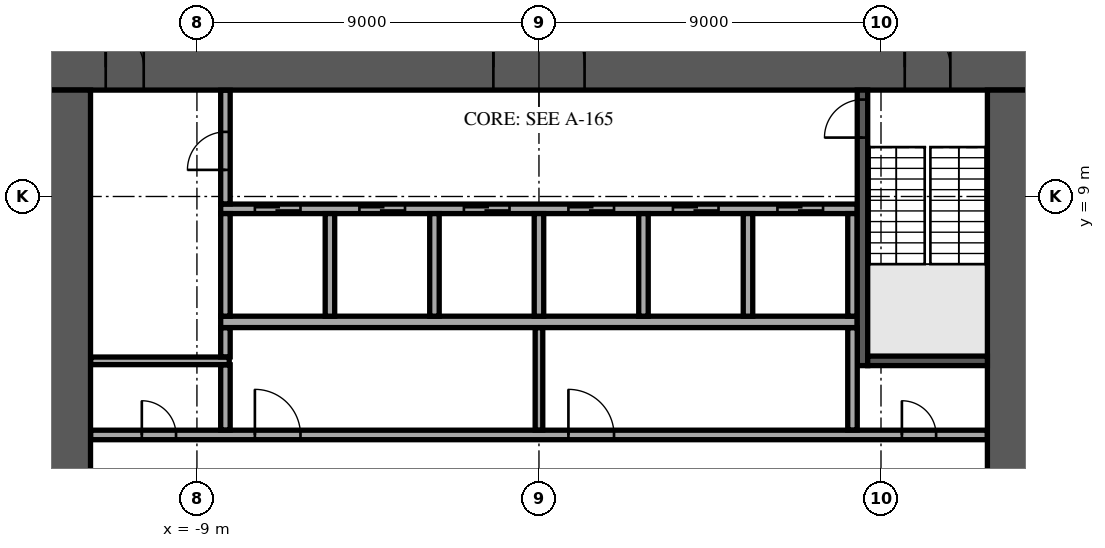
"""IFC4 building model, lengths in metres.
Left out: names, types, materials, properties, quantities, classifications, styles, units other than length and angle.
Written with IfcOpenShell. Run it as: python <this file> out.ifc"""

import sys

from ifc_helpers import new_model, si_unit, direction, frame, frame_2d, origin, place, context, subcontext, project, spatial, rectangle, extrude, element, fill, save


model = new_model("IFC4")
c1 = context("Model", 3, precision=1e-05, world=origin(), true_north=direction((0.0, 1.0)))
c2 = subcontext(c1, "Body", "Model", "MODEL_VIEW")
j1 = project(units=[si_unit("LENGTHUNIT", "METRE"), si_unit("PLANEANGLEUNIT", "RADIAN")], contexts=[c1])
p1 = place(None, origin())
s1 = spatial("IfcSite", under=j1, at=p1, CompositionType="ELEMENT")
p2 = place(p1, origin())
s2 = spatial("IfcBuilding", under=s1, at=p2, CompositionType="ELEMENT")
p3 = place(p2, frame((0.0, 0.0, 9.0)))
s3 = spatial("IfcBuildingStorey", under=s2, at=p3, CompositionType="ELEMENT", Elevation=9.0)
p4 = place(p3, frame((-13.0, 12.4, 0.0), z_axis=(0.0, 0.0, 1.0), x_axis=(1.0, 0.0, 0.0)))
e1 = element("IfcWall", 1, at=p4, inside=s3, PredefinedType="SHEAR", context=c2, shape_type="SweptSolid", body=[
    extrude(rectangle(XDim=26.0, YDim=1.2, at=frame_2d((13.0, 0.0))), origin(), (0.0, 0.0, 1.0), 4.1),
])
p5 = place(p4, frame((11.8, 0.0, 0.0)))
e2 = element("IfcOpeningElement", 2, at=p5, cuts=e1, PredefinedType="OPENING", context=c2, shape_type="SweptSolid", body=[
    extrude(rectangle(XDim=2.4, YDim=2.4, at=frame_2d((1.2, 1.2))), frame((0.0, 0.61, 0.0), z_axis=(0.0, -1.0, 0.0), x_axis=(1.0, 0.0, 0.0)), (0.0, 0.0, 1.0), 1.22),
])
p6 = place(p4, frame((22.625, 0.0, 0.0)))
e3 = element("IfcOpeningElement", 3, at=p6, cuts=e1, PredefinedType="OPENING", context=c2, shape_type="SweptSolid", body=[
    extrude(rectangle(XDim=1.2, YDim=2.1, at=frame_2d((0.6, 1.05))), frame((0.0, 0.61, 0.0), z_axis=(0.0, -1.0, 0.0), x_axis=(1.0, 0.0, 0.0)), (0.0, 0.0, 1.0), 1.22),
])
p7 = place(p4, frame((1.6, 0.0, 0.0)))
e4 = element("IfcOpeningElement", 4, at=p7, cuts=e1, PredefinedType="OPENING", context=c2, shape_type="SweptSolid", body=[
    extrude(rectangle(XDim=1.0, YDim=2.1, at=frame_2d((0.5, 1.05))), frame((0.0, 0.61, 0.0), z_axis=(0.0, -1.0, 0.0), x_axis=(1.0, 0.0, 0.0)), (0.0, 0.0, 1.0), 1.22),
])
p8 = place(p3, frame((12.4, -11.8, 0.0), z_axis=(0.0, 0.0, 1.0), x_axis=(0.0, 1.0, 0.0)))
e5 = element("IfcWall", 5, at=p8, inside=s3, PredefinedType="SHEAR", context=c2, shape_type="SweptSolid", body=[
    extrude(rectangle(XDim=23.6, YDim=1.2, at=frame_2d((11.8, 0.0))), origin(), (0.0, 0.0, 1.0), 4.1),
])
p9 = place(p8, frame((10.6, 0.0, 0.0)))
e6 = element("IfcOpeningElement", 6, at=p9, cuts=e5, PredefinedType="OPENING", context=c2, shape_type="SweptSolid", body=[
    extrude(rectangle(XDim=2.4, YDim=2.4, at=frame_2d((1.2, 1.2))), frame((0.0, 0.61, 0.0), z_axis=(0.0, -1.0, 0.0), x_axis=(1.0, 0.0, 0.0)), (0.0, 0.0, 1.0), 1.22),
])
p10 = place(p3, frame((-12.4, -11.8, 0.0), z_axis=(0.0, 0.0, 1.0), x_axis=(0.0, 1.0, 0.0)))
e7 = element("IfcWall", 7, at=p10, inside=s3, PredefinedType="SHEAR", context=c2, shape_type="SweptSolid", body=[
    extrude(rectangle(XDim=23.6, YDim=1.2, at=frame_2d((11.8, 0.0))), origin(), (0.0, 0.0, 1.0), 4.1),
])
p11 = place(p10, frame((10.6, 0.0, 0.0)))
e8 = element("IfcOpeningElement", 8, at=p11, cuts=e7, PredefinedType="OPENING", context=c2, shape_type="SweptSolid", body=[
    extrude(rectangle(XDim=2.4, YDim=2.4, at=frame_2d((1.2, 1.2))), frame((0.0, 0.61, 0.0), z_axis=(0.0, -1.0, 0.0), x_axis=(1.0, 0.0, 0.0)), (0.0, 0.0, 1.0), 1.22),
])
p12 = place(p3, frame((-8.375, 5.7, 0.0), z_axis=(0.0, 0.0, 1.0), x_axis=(1.0, 0.0, 0.0)))
e9 = element("IfcWall", 9, at=p12, inside=s3, PredefinedType="SOLIDWALL", context=c2, shape_type="SweptSolid", body=[
    extrude(rectangle(XDim=16.75, YDim=0.3, at=frame_2d((8.375, 0.0))), origin(), (0.0, 0.0, 1.0), 4.1),
])
p13 = place(p3, frame((-8.375, 8.675, 0.0), z_axis=(0.0, 0.0, 1.0), x_axis=(1.0, 0.0, 0.0)))
e10 = element("IfcWall", 10, at=p13, inside=s3, PredefinedType="SOLIDWALL", context=c2, shape_type="SweptSolid", body=[
    extrude(rectangle(XDim=16.75, YDim=0.25, at=frame_2d((8.375, 0.0))), origin(), (0.0, 0.0, 1.0), 4.1),
])
p14 = place(p13, frame((0.9, 0.0, 0.0)))
e11 = element("IfcOpeningElement", 11, at=p14, cuts=e10, PredefinedType="OPENING", context=c2, shape_type="SweptSolid", body=[
    extrude(rectangle(XDim=1.2, YDim=2.1, at=frame_2d((0.6, 1.05))), frame((0.0, 0.135, 0.0), z_axis=(0.0, -1.0, 0.0), x_axis=(1.0, 0.0, 0.0)), (0.0, 0.0, 1.0), 0.27),
])
p15 = place(p13, frame((3.65, 0.0, 0.0)))
e12 = element("IfcOpeningElement", 12, at=p15, cuts=e10, PredefinedType="OPENING", context=c2, shape_type="SweptSolid", body=[
    extrude(rectangle(XDim=1.2, YDim=2.1, at=frame_2d((0.6, 1.05))), frame((0.0, 0.135, 0.0), z_axis=(0.0, -1.0, 0.0), x_axis=(1.0, 0.0, 0.0)), (0.0, 0.0, 1.0), 0.27),
])
p16 = place(p13, frame((6.4, 0.0, 0.0)))
e13 = element("IfcOpeningElement", 13, at=p16, cuts=e10, PredefinedType="OPENING", context=c2, shape_type="SweptSolid", body=[
    extrude(rectangle(XDim=1.2, YDim=2.1, at=frame_2d((0.6, 1.05))), frame((0.0, 0.135, 0.0), z_axis=(0.0, -1.0, 0.0), x_axis=(1.0, 0.0, 0.0)), (0.0, 0.0, 1.0), 0.27),
])
p17 = place(p13, frame((9.15, 0.0, 0.0)))
e14 = element("IfcOpeningElement", 14, at=p17, cuts=e10, PredefinedType="OPENING", context=c2, shape_type="SweptSolid", body=[
    extrude(rectangle(XDim=1.2, YDim=2.1, at=frame_2d((0.6, 1.05))), frame((0.0, 0.135, 0.0), z_axis=(0.0, -1.0, 0.0), x_axis=(1.0, 0.0, 0.0)), (0.0, 0.0, 1.0), 0.27),
])
p18 = place(p13, frame((11.9, 0.0, 0.0)))
e15 = element("IfcOpeningElement", 15, at=p18, cuts=e10, PredefinedType="OPENING", context=c2, shape_type="SweptSolid", body=[
    extrude(rectangle(XDim=1.2, YDim=2.1, at=frame_2d((0.6, 1.05))), frame((0.0, 0.135, 0.0), z_axis=(0.0, -1.0, 0.0), x_axis=(1.0, 0.0, 0.0)), (0.0, 0.0, 1.0), 0.27),
])
p19 = place(p13, frame((14.65, 0.0, 0.0)))
e16 = element("IfcOpeningElement", 16, at=p19, cuts=e10, PredefinedType="OPENING", context=c2, shape_type="SweptSolid", body=[
    extrude(rectangle(XDim=1.2, YDim=2.1, at=frame_2d((0.6, 1.05))), frame((0.0, 0.135, 0.0), z_axis=(0.0, -1.0, 0.0), x_axis=(1.0, 0.0, 0.0)), (0.0, 0.0, 1.0), 0.27),
])
for number, where, z_axis, x_axis in (
    (17, (-8.25, 5.85, 0.0), (0.0, 0.0, 1.0), (0.0, 1.0, 0.0)),
    (18, (-5.5, 5.85, 0.0), (0.0, 0.0, 1.0), (0.0, 1.0, 0.0)),
    (19, (-2.75, 5.85, 0.0), (0.0, 0.0, 1.0), (0.0, 1.0, 0.0)),
    (20, (0.0, 5.85, 0.0), (0.0, 0.0, 1.0), (0.0, 1.0, 0.0)),
    (21, (2.75, 5.85, 0.0), (0.0, 0.0, 1.0), (0.0, 1.0, 0.0)),
    (22, (5.5, 5.85, 0.0), (0.0, 0.0, 1.0), (0.0, 1.0, 0.0)),
    (23, (8.25, 5.85, 0.0), (0.0, 0.0, 1.0), (0.0, 1.0, 0.0)),
):
    element("IfcWall", number, at=place(p3, frame(where, z_axis=z_axis, x_axis=x_axis)), inside=s3, PredefinedType="SOLIDWALL", context=c2, shape_type="SweptSolid", body=[
        extrude(rectangle(XDim=2.7, YDim=0.25, at=frame_2d((1.35, 0.0))), origin(), (0.0, 0.0, 1.0), 4.1),
    ])
p20 = place(p3, frame((8.512, 4.55, 0.0), z_axis=(0.0, 0.0, 1.0), x_axis=(0.0, 1.0, 0.0)))
e24 = element("IfcWall", 24, at=p20, inside=s3, PredefinedType="SOLIDWALL", context=c2, shape_type="SweptSolid", body=[
    extrude(rectangle(XDim=7.25, YDim=0.275, at=frame_2d((3.625, 0.0))), origin(), (0.0, 0.0, 1.0), 4.1),
])
p21 = place(p20, frame((6.0, 0.0, 0.0)))
e25 = element("IfcOpeningElement", 25, at=p21, cuts=e24, PredefinedType="OPENING", context=c2, shape_type="SweptSolid", body=[
    extrude(rectangle(XDim=1.0, YDim=2.1, at=frame_2d((0.5, 1.05))), frame((0.0, 0.147, 0.0), z_axis=(0.0, -1.0, 0.0), x_axis=(1.0, 0.0, 0.0)), (0.0, 0.0, 1.0), 0.295),
])
p22 = place(p3, frame((8.65, 4.675, 0.0), z_axis=(0.0, 0.0, 1.0), x_axis=(1.0, 0.0, 0.0)))
e26 = element("IfcWall", 26, at=p22, inside=s3, PredefinedType="SOLIDWALL", context=c2, shape_type="SweptSolid", body=[
    extrude(rectangle(XDim=3.15, YDim=0.25, at=frame_2d((1.575, 0.0))), origin(), (0.0, 0.0, 1.0), 4.1),
])
p23 = place(p3, frame((-11.795, 2.725, 0.0), z_axis=(0.0, 0.0, 1.0), x_axis=(1.0, 0.0, 0.0)))
e27 = element("IfcWall", 27, at=p23, inside=s3, PredefinedType="PARTITIONING", context=c2, shape_type="SweptSolid", body=[
    extrude(rectangle(XDim=23.59, YDim=0.25, at=frame_2d((11.795, 0.0))), origin(), (0.0, 0.0, 1.0), 4.1),
])
p24 = place(p23, frame((21.345, 0.0, 0.0)))
e28 = element("IfcOpeningElement", 28, at=p24, cuts=e27, PredefinedType="OPENING", context=c2, shape_type="SweptSolid", body=[
    extrude(rectangle(XDim=0.9, YDim=2.1, at=frame_2d((0.45, 1.05))), frame((0.0, 0.135, 0.0), z_axis=(0.0, -1.0, 0.0), x_axis=(1.0, 0.0, 0.0)), (0.0, 0.0, 1.0), 0.27),
])
p25 = place(p23, frame((1.345, 0.0, 0.0)))
e29 = element("IfcOpeningElement", 29, at=p25, cuts=e27, PredefinedType="OPENING", context=c2, shape_type="SweptSolid", body=[
    extrude(rectangle(XDim=0.9, YDim=2.1, at=frame_2d((0.45, 1.05))), frame((0.0, 0.135, 0.0), z_axis=(0.0, -1.0, 0.0), x_axis=(1.0, 0.0, 0.0)), (0.0, 0.0, 1.0), 0.27),
])
p26 = place(p23, frame((4.32, 0.0, 0.0)))
e30 = element("IfcOpeningElement", 30, at=p26, cuts=e27, PredefinedType="OPENING", context=c2, shape_type="SweptSolid", body=[
    extrude(rectangle(XDim=1.2, YDim=2.1, at=frame_2d((0.6, 1.05))), frame((0.0, 0.135, 0.0), z_axis=(0.0, -1.0, 0.0), x_axis=(1.0, 0.0, 0.0)), (0.0, 0.0, 1.0), 0.27),
])
p27 = place(p23, frame((12.57, 0.0, 0.0)))
e31 = element("IfcOpeningElement", 31, at=p27, cuts=e27, PredefinedType="OPENING", context=c2, shape_type="SweptSolid", body=[
    extrude(rectangle(XDim=1.2, YDim=2.1, at=frame_2d((0.6, 1.05))), frame((0.0, 0.135, 0.0), z_axis=(0.0, -1.0, 0.0), x_axis=(1.0, 0.0, 0.0)), (0.0, 0.0, 1.0), 0.27),
])
p28 = place(p3, frame((-8.25, 2.855, 0.0), z_axis=(0.0, 0.0, 1.0), x_axis=(0.0, 1.0, 0.0)))
e32 = element("IfcWall", 32, at=p28, inside=s3, PredefinedType="PARTITIONING", context=c2, shape_type="SweptSolid", body=[
    extrude(rectangle(XDim=1.715, YDim=0.25, at=frame_2d((0.857, 0.0))), origin(), (0.0, 0.0, 1.0), 4.1),
])
p29 = place(p3, frame((0.0, 2.855, 0.0), z_axis=(0.0, 0.0, 1.0), x_axis=(0.0, 1.0, 0.0)))
e33 = element("IfcWall", 33, at=p29, inside=s3, PredefinedType="PARTITIONING", context=c2, shape_type="SweptSolid", body=[
    extrude(rectangle(XDim=2.69, YDim=0.2, at=frame_2d((1.345, 0.0))), origin(), (0.0, 0.0, 1.0), 4.1),
])
p30 = place(p3, frame((8.25, 2.855, 0.0), z_axis=(0.0, 0.0, 1.0), x_axis=(0.0, 1.0, 0.0)))
e34 = element("IfcWall", 34, at=p30, inside=s3, PredefinedType="PARTITIONING", context=c2, shape_type="SweptSolid", body=[
    extrude(rectangle(XDim=2.69, YDim=0.25, at=frame_2d((1.345, 0.0))), origin(), (0.0, 0.0, 1.0), 4.1),
])
p31 = place(p3, frame((-11.795, 4.675, 0.0), z_axis=(0.0, 0.0, 1.0), x_axis=(1.0, 0.0, 0.0)))
e35 = element("IfcWall", 35, at=p31, inside=s3, PredefinedType="PARTITIONING", context=c2, shape_type="SweptSolid", body=[
    extrude(rectangle(XDim=3.645, YDim=0.2, at=frame_2d((1.823, 0.0))), origin(), (0.0, 0.0, 1.0), 4.1),
])
p32 = place(p3, frame((-8.25, 4.78, 0.0), z_axis=(0.0, 0.0, 1.0), x_axis=(0.0, 1.0, 0.0)))
e36 = element("IfcWall", 36, at=p32, inside=s3, PredefinedType="PARTITIONING", context=c2, shape_type="SweptSolid", body=[
    extrude(rectangle(XDim=0.765, YDim=0.25, at=frame_2d((0.382, 0.0))), origin(), (0.0, 0.0, 1.0), 4.1),
])
p33 = place(p3, frame((-8.25, 8.805, 0.0), z_axis=(0.0, 0.0, 1.0), x_axis=(0.0, 1.0, 0.0)))
e37 = element("IfcWall", 37, at=p33, inside=s3, PredefinedType="PARTITIONING", context=c2, shape_type="SweptSolid", body=[
    extrude(rectangle(XDim=2.99, YDim=0.25, at=frame_2d((1.495, 0.0))), origin(), (0.0, 0.0, 1.0), 4.1),
])
p34 = place(p33, frame((0.895, 0.0, 0.0)))
e38 = element("IfcOpeningElement", 38, at=p34, cuts=e37, PredefinedType="OPENING", context=c2, shape_type="SweptSolid", body=[
    extrude(rectangle(XDim=1.0, YDim=2.1, at=frame_2d((0.5, 1.05))), frame((0.0, 0.135, 0.0), z_axis=(0.0, -1.0, 0.0), x_axis=(1.0, 0.0, 0.0)), (0.0, 0.0, 1.0), 0.27),
])
p35 = place(p5, origin())
e39 = element("IfcDoor", 39, at=p35, inside=s3, OperationType="SINGLE_SWING_LEFT", PredefinedType="DOOR", context=c2, shape_type="SweptSolid", body=[
    extrude(rectangle(XDim=2.4, YDim=2.4, at=frame_2d((1.2, 1.2))), frame((0.0, 0.025, 0.0), z_axis=(0.0, -1.0, 0.0), x_axis=(1.0, 0.0, 0.0)), (0.0, 0.0, 1.0), 0.05),
])
fill(e2, e39)
p36 = place(p6, origin())
e40 = element("IfcDoor", 40, at=p36, inside=s3, OperationType="SINGLE_SWING_LEFT", PredefinedType="DOOR", context=c2, shape_type="SweptSolid", body=[
    extrude(rectangle(XDim=1.2, YDim=2.1, at=frame_2d((0.6, 1.05))), frame((0.0, 0.025, 0.0), z_axis=(0.0, -1.0, 0.0), x_axis=(1.0, 0.0, 0.0)), (0.0, 0.0, 1.0), 0.05),
])
fill(e3, e40)
p37 = place(p7, origin())
e41 = element("IfcDoor", 41, at=p37, inside=s3, OperationType="SINGLE_SWING_LEFT", PredefinedType="DOOR", context=c2, shape_type="SweptSolid", body=[
    extrude(rectangle(XDim=1.0, YDim=2.1, at=frame_2d((0.5, 1.05))), frame((0.0, 0.025, 0.0), z_axis=(0.0, -1.0, 0.0), x_axis=(1.0, 0.0, 0.0)), (0.0, 0.0, 1.0), 0.05),
])
fill(e4, e41)
p38 = place(p14, origin())
e42 = element("IfcDoor", 42, at=p38, inside=s3, OperationType="DOUBLE_DOOR_SLIDING", PredefinedType="DOOR", context=c2, shape_type="SweptSolid", body=[
    extrude(rectangle(XDim=1.2, YDim=2.1, at=frame_2d((0.6, 1.05))), frame((0.0, 0.025, 0.0), z_axis=(0.0, -1.0, 0.0), x_axis=(1.0, 0.0, 0.0)), (0.0, 0.0, 1.0), 0.05),
])
fill(e11, e42)
p39 = place(p15, origin())
e43 = element("IfcDoor", 43, at=p39, inside=s3, OperationType="DOUBLE_DOOR_SLIDING", PredefinedType="DOOR", context=c2, shape_type="SweptSolid", body=[
    extrude(rectangle(XDim=1.2, YDim=2.1, at=frame_2d((0.6, 1.05))), frame((0.0, 0.025, 0.0), z_axis=(0.0, -1.0, 0.0), x_axis=(1.0, 0.0, 0.0)), (0.0, 0.0, 1.0), 0.05),
])
fill(e12, e43)
p40 = place(p16, origin())
e44 = element("IfcDoor", 44, at=p40, inside=s3, OperationType="DOUBLE_DOOR_SLIDING", PredefinedType="DOOR", context=c2, shape_type="SweptSolid", body=[
    extrude(rectangle(XDim=1.2, YDim=2.1, at=frame_2d((0.6, 1.05))), frame((0.0, 0.025, 0.0), z_axis=(0.0, -1.0, 0.0), x_axis=(1.0, 0.0, 0.0)), (0.0, 0.0, 1.0), 0.05),
])
fill(e13, e44)
p41 = place(p17, origin())
e45 = element("IfcDoor", 45, at=p41, inside=s3, OperationType="DOUBLE_DOOR_SLIDING", PredefinedType="DOOR", context=c2, shape_type="SweptSolid", body=[
    extrude(rectangle(XDim=1.2, YDim=2.1, at=frame_2d((0.6, 1.05))), frame((0.0, 0.025, 0.0), z_axis=(0.0, -1.0, 0.0), x_axis=(1.0, 0.0, 0.0)), (0.0, 0.0, 1.0), 0.05),
])
fill(e14, e45)
p42 = place(p18, origin())
e46 = element("IfcDoor", 46, at=p42, inside=s3, OperationType="DOUBLE_DOOR_SLIDING", PredefinedType="DOOR", context=c2, shape_type="SweptSolid", body=[
    extrude(rectangle(XDim=1.2, YDim=2.1, at=frame_2d((0.6, 1.05))), frame((0.0, 0.025, 0.0), z_axis=(0.0, -1.0, 0.0), x_axis=(1.0, 0.0, 0.0)), (0.0, 0.0, 1.0), 0.05),
])
fill(e15, e46)
p43 = place(p19, origin())
e47 = element("IfcDoor", 47, at=p43, inside=s3, OperationType="DOUBLE_DOOR_SLIDING", PredefinedType="DOOR", context=c2, shape_type="SweptSolid", body=[
    extrude(rectangle(XDim=1.2, YDim=2.1, at=frame_2d((0.6, 1.05))), frame((0.0, 0.025, 0.0), z_axis=(0.0, -1.0, 0.0), x_axis=(1.0, 0.0, 0.0)), (0.0, 0.0, 1.0), 0.05),
])
fill(e16, e47)
p44 = place(p21, origin())
e48 = element("IfcDoor", 48, at=p44, inside=s3, OperationType="SINGLE_SWING_LEFT", PredefinedType="DOOR", context=c2, shape_type="SweptSolid", body=[
    extrude(rectangle(XDim=1.0, YDim=2.1, at=frame_2d((0.5, 1.05))), frame((0.0, 0.025, 0.0), z_axis=(0.0, -1.0, 0.0), x_axis=(1.0, 0.0, 0.0)), (0.0, 0.0, 1.0), 0.05),
])
fill(e25, e48)
p45 = place(p24, origin())
e49 = element("IfcDoor", 49, at=p45, inside=s3, OperationType="SINGLE_SWING_LEFT", PredefinedType="DOOR", context=c2, shape_type="SweptSolid", body=[
    extrude(rectangle(XDim=0.9, YDim=2.1, at=frame_2d((0.45, 1.05))), frame((0.0, 0.025, 0.0), z_axis=(0.0, -1.0, 0.0), x_axis=(1.0, 0.0, 0.0)), (0.0, 0.0, 1.0), 0.05),
])
fill(e28, e49)
p46 = place(p25, origin())
e50 = element("IfcDoor", 50, at=p46, inside=s3, OperationType="SINGLE_SWING_LEFT", PredefinedType="DOOR", context=c2, shape_type="SweptSolid", body=[
    extrude(rectangle(XDim=0.9, YDim=2.1, at=frame_2d((0.45, 1.05))), frame((0.0, 0.025, 0.0), z_axis=(0.0, -1.0, 0.0), x_axis=(1.0, 0.0, 0.0)), (0.0, 0.0, 1.0), 0.05),
])
fill(e29, e50)
p47 = place(p34, origin())
e51 = element("IfcDoor", 51, at=p47, inside=s3, OperationType="SINGLE_SWING_LEFT", PredefinedType="DOOR", context=c2, shape_type="SweptSolid", body=[
    extrude(rectangle(XDim=1.0, YDim=2.1, at=frame_2d((0.5, 1.05))), frame((0.0, 0.025, 0.0), z_axis=(0.0, -1.0, 0.0), x_axis=(1.0, 0.0, 0.0)), (0.0, 0.0, 1.0), 0.05),
])
fill(e38, e51)
p48 = place(p26, origin())
e52 = element("IfcDoor", 52, at=p48, inside=s3, OperationType="SINGLE_SWING_LEFT", PredefinedType="DOOR", context=c2, shape_type="SweptSolid", body=[
    extrude(rectangle(XDim=1.2, YDim=2.1, at=frame_2d((0.6, 1.05))), frame((0.0, 0.025, 0.0), z_axis=(0.0, -1.0, 0.0), x_axis=(1.0, 0.0, 0.0)), (0.0, 0.0, 1.0), 0.05),
])
fill(e30, e52)
p49 = place(p27, origin())
e53 = element("IfcDoor", 53, at=p49, inside=s3, OperationType="SINGLE_SWING_LEFT", PredefinedType="DOOR", context=c2, shape_type="SweptSolid", body=[
    extrude(rectangle(XDim=1.2, YDim=2.1, at=frame_2d((0.6, 1.05))), frame((0.0, 0.025, 0.0), z_axis=(0.0, -1.0, 0.0), x_axis=(1.0, 0.0, 0.0)), (0.0, 0.0, 1.0), 0.05),
])
fill(e31, e53)
save(model, sys.argv[1])
